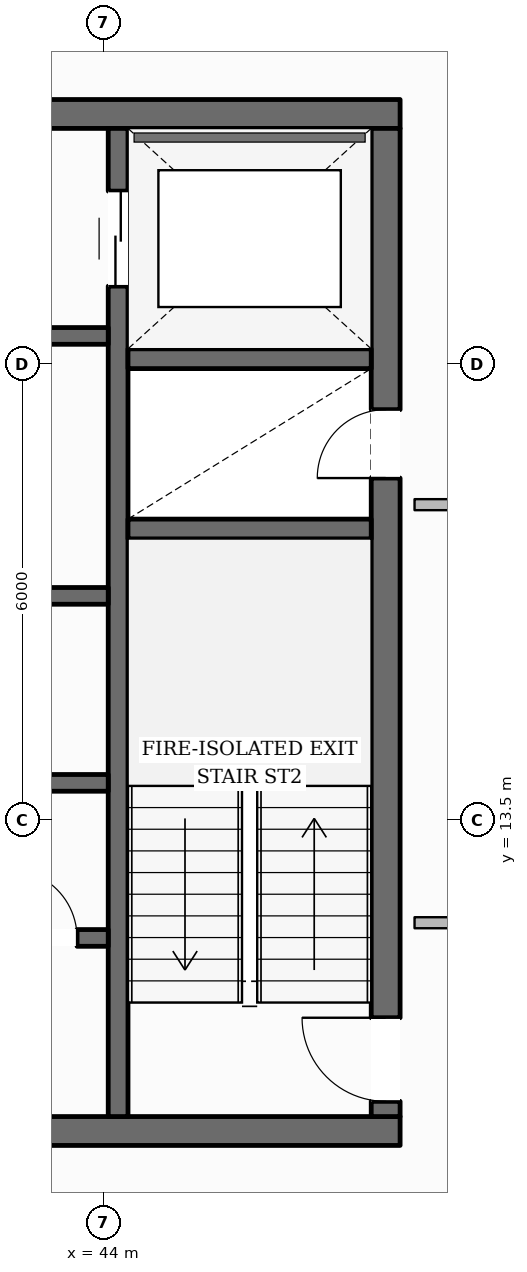
"""IFC4 building model, lengths in metres.
Left out: names, types, materials, properties, quantities, classifications, styles, units other than length and angle.
Written with IfcOpenShell. Run it as: python <this file> out.ifc"""

import sys

from ifc_helpers import new_model, si_unit, direction, frame, frame_2d, origin, place, context, subcontext, project, spatial, rectangle, extrude, element, fill, save


model = new_model("IFC4")
c1 = context("Model", 3, precision=1e-05, world=origin(), true_north=direction((0.0, 1.0)))
c2 = subcontext(c1, "Body", "Model", "MODEL_VIEW")
j1 = project(units=[si_unit("LENGTHUNIT", "METRE"), si_unit("PLANEANGLEUNIT", "RADIAN")], contexts=[c1])
p1 = place(None, origin())
s1 = spatial("IfcSite", under=j1, at=p1, CompositionType="ELEMENT")
p2 = place(p1, origin())
s2 = spatial("IfcBuilding", under=s1, at=p2, CompositionType="ELEMENT")
p3 = place(p2, frame((0.0, 0.0, 293.4)))
s3 = spatial("IfcBuildingStorey", under=s2, at=p3, CompositionType="ELEMENT", Elevation=293.4)
p4 = place(p3, frame((28.1, 9.41, 0.0), z_axis=(0.0, 0.0, 1.0), x_axis=(1.0, 0.0, 0.0)))
e1 = element("IfcWall", 1, at=p4, inside=s3, PredefinedType="SOLIDWALL", context=c2, shape_type="SweptSolid", body=[
    extrude(rectangle(XDim=19.8, YDim=0.38, at=frame_2d((9.9, 0.0))), origin(), (0.0, 0.0, 1.0), 3.61),
])
p5 = place(p4, frame((10.4, 0.0, 0.0)))
e2 = element("IfcOpeningElement", 2, at=p5, cuts=e1, PredefinedType="OPENING", context=c2, shape_type="SweptSolid", body=[
    extrude(rectangle(XDim=1.4, YDim=2.2, at=frame_2d((0.7, 1.1))), frame((0.0, 0.2, 0.0), z_axis=(0.0, -1.0, 0.0), x_axis=(1.0, 0.0, 0.0)), (0.0, 0.0, 1.0), 0.4),
])
p6 = place(p3, frame((28.1, 22.79, 0.0), z_axis=(0.0, 0.0, 1.0), x_axis=(1.0, 0.0, 0.0)))
e3 = element("IfcWall", 3, at=p6, inside=s3, PredefinedType="SOLIDWALL", context=c2, shape_type="SweptSolid", body=[
    extrude(rectangle(XDim=19.8, YDim=0.38, at=frame_2d((9.9, 0.0))), origin(), (0.0, 0.0, 1.0), 3.61),
])
p7 = place(p6, frame((6.175, 0.0, 0.0)))
e4 = element("IfcOpeningElement", 4, at=p7, cuts=e3, PredefinedType="OPENING", context=c2, shape_type="SweptSolid", body=[
    extrude(rectangle(XDim=1.05, YDim=2.15, at=frame_2d((0.525, 1.075))), frame((0.0, 0.2, 0.0), z_axis=(0.0, -1.0, 0.0), x_axis=(1.0, 0.0, 0.0)), (0.0, 0.0, 1.0), 0.4),
])
p8 = place(p6, frame((12.575, 0.0, 0.0)))
e5 = element("IfcOpeningElement", 5, at=p8, cuts=e3, PredefinedType="OPENING", context=c2, shape_type="SweptSolid", body=[
    extrude(rectangle(XDim=1.05, YDim=2.15, at=frame_2d((0.525, 1.075))), frame((0.0, 0.2, 0.0), z_axis=(0.0, -1.0, 0.0), x_axis=(1.0, 0.0, 0.0)), (0.0, 0.0, 1.0), 0.4),
])
p9 = place(p3, frame((47.71, 9.6, 0.0), z_axis=(0.0, 0.0, 1.0), x_axis=(0.0, 1.0, 0.0)))
e6 = element("IfcWall", 6, at=p9, inside=s3, PredefinedType="SOLIDWALL", context=c2, shape_type="SweptSolid", body=[
    extrude(rectangle(XDim=13.0, YDim=0.38, at=frame_2d((6.5, 0.0))), origin(), (0.0, 0.0, 1.0), 3.61),
])
p10 = place(p9, frame((0.2, 0.0, 0.0)))
e7 = element("IfcOpeningElement", 7, at=p10, cuts=e6, PredefinedType="OPENING", context=c2, shape_type="SweptSolid", body=[
    extrude(rectangle(XDim=1.1, YDim=2.15, at=frame_2d((0.55, 1.075))), frame((0.0, 0.2, 0.0), z_axis=(0.0, -1.0, 0.0), x_axis=(1.0, 0.0, 0.0)), (0.0, 0.0, 1.0), 0.4),
])
p11 = place(p9, frame((8.4, 0.0, 0.0)))
e8 = element("IfcOpeningElement", 8, at=p11, cuts=e6, PredefinedType="OPENING", context=c2, shape_type="SweptSolid", body=[
    extrude(rectangle(XDim=0.9, YDim=2.1, at=frame_2d((0.45, 1.05))), frame((0.0, 0.2, 0.0), z_axis=(0.0, -1.0, 0.0), x_axis=(1.0, 0.0, 0.0)), (0.0, 0.0, 1.0), 0.4),
])
p12 = place(p3, frame((44.19, 9.6, 0.0), z_axis=(0.0, 0.0, 1.0), x_axis=(0.0, 1.0, 0.0)))
e9 = element("IfcWall", 9, at=p12, inside=s3, PredefinedType="SHEAR", context=c2, shape_type="SweptSolid", body=[
    extrude(rectangle(XDim=13.0, YDim=0.26, at=frame_2d((6.5, 0.0))), origin(), (0.0, 0.0, 1.0), 3.61),
])
p13 = place(p12, frame((10.925, 0.0, 0.0)))
e10 = element("IfcOpeningElement", 10, at=p13, cuts=e9, PredefinedType="OPENING", context=c2, shape_type="SweptSolid", body=[
    extrude(rectangle(XDim=1.25, YDim=2.25, at=frame_2d((0.625, 1.125))), frame((0.0, 0.14, 0.0), z_axis=(0.0, -1.0, 0.0), x_axis=(1.0, 0.0, 0.0)), (0.0, 0.0, 1.0), 0.28),
])
for number, where, z_axis, x_axis in (
    (11, (44.32, 17.33, 0.0), (0.0, 0.0, 1.0), (1.0, 0.0, 0.0)),
    (12, (44.32, 19.57, 0.0), (0.0, 0.0, 1.0), (1.0, 0.0, 0.0)),
):
    element("IfcWall", number, at=place(p3, frame(where, z_axis=z_axis, x_axis=x_axis)), inside=s3, PredefinedType="SHEAR", context=c2, shape_type="SweptSolid", body=[
        extrude(rectangle(XDim=3.2, YDim=0.26, at=frame_2d((1.6, 0.0))), origin(), (0.0, 0.0, 1.0), 3.61),
    ])
p14 = place(p3, frame((31.94, 19.87, 0.0), z_axis=(0.0, 0.0, 1.0), x_axis=(1.0, 0.0, 0.0)))
e13 = element("IfcWall", 13, at=p14, inside=s3, PredefinedType="SOLIDWALL", context=c2, shape_type="SweptSolid", body=[
    extrude(rectangle(XDim=12.12, YDim=0.22, at=frame_2d((6.06, 0.0))), origin(), (0.0, 0.0, 1.0), 3.61),
])
p15 = place(p14, frame((6.3, 0.0, 0.0)))
e14 = element("IfcOpeningElement", 14, at=p15, cuts=e13, PredefinedType="OPENING", context=c2, shape_type="SweptSolid", body=[
    extrude(rectangle(XDim=1.1, YDim=2.15, at=frame_2d((0.55, 1.075))), frame((0.0, 0.12, 0.0), z_axis=(0.0, -1.0, 0.0), x_axis=(1.0, 0.0, 0.0)), (0.0, 0.0, 1.0), 0.24),
])
p16 = place(p14, frame((9.51, 0.0, 0.0)))
e15 = element("IfcOpeningElement", 15, at=p16, cuts=e13, PredefinedType="OPENING", context=c2, shape_type="SweptSolid", body=[
    extrude(rectangle(XDim=0.9, YDim=2.1, at=frame_2d((0.45, 1.05))), frame((0.0, 0.12, 0.0), z_axis=(0.0, -1.0, 0.0), x_axis=(1.0, 0.0, 0.0)), (0.0, 0.0, 1.0), 0.24),
])
p17 = place(p3, frame((31.94, 16.45, 0.0), z_axis=(0.0, 0.0, 1.0), x_axis=(1.0, 0.0, 0.0)))
e16 = element("IfcWall", 16, at=p17, inside=s3, PredefinedType="SOLIDWALL", context=c2, shape_type="SweptSolid", body=[
    extrude(rectangle(XDim=12.12, YDim=0.22, at=frame_2d((6.06, 0.0))), origin(), (0.0, 0.0, 1.0), 3.61),
])
p18 = place(p3, frame((31.94, 13.99, 0.0), z_axis=(0.0, 0.0, 1.0), x_axis=(1.0, 0.0, 0.0)))
e17 = element("IfcWall", 17, at=p18, inside=s3, PredefinedType="SOLIDWALL", context=c2, shape_type="SweptSolid", body=[
    extrude(rectangle(XDim=12.12, YDim=0.22, at=frame_2d((6.06, 0.0))), origin(), (0.0, 0.0, 1.0), 3.61),
])
p19 = place(p18, frame((3.11, 0.0, 0.0)))
e18 = element("IfcOpeningElement", 18, at=p19, cuts=e17, PredefinedType="OPENING", context=c2, shape_type="SweptSolid", body=[
    extrude(rectangle(XDim=0.9, YDim=2.1, at=frame_2d((0.45, 1.05))), frame((0.0, 0.12, 0.0), z_axis=(0.0, -1.0, 0.0), x_axis=(1.0, 0.0, 0.0)), (0.0, 0.0, 1.0), 0.24),
])
p20 = place(p18, frame((9.21, 0.0, 0.0)))
e19 = element("IfcOpeningElement", 19, at=p20, cuts=e17, PredefinedType="OPENING", context=c2, shape_type="SweptSolid", body=[
    extrude(rectangle(XDim=0.9, YDim=2.1, at=frame_2d((0.45, 1.05))), frame((0.0, 0.12, 0.0), z_axis=(0.0, -1.0, 0.0), x_axis=(1.0, 0.0, 0.0)), (0.0, 0.0, 1.0), 0.24),
])
p21 = place(p3, frame((40.28, 11.95, 0.0), z_axis=(0.0, 0.0, 1.0), x_axis=(1.0, 0.0, 0.0)))
e20 = element("IfcWall", 20, at=p21, inside=s3, PredefinedType="SOLIDWALL", context=c2, shape_type="SweptSolid", body=[
    extrude(rectangle(XDim=3.78, YDim=0.22, at=frame_2d((1.89, 0.0))), origin(), (0.0, 0.0, 1.0), 3.61),
])
p22 = place(p21, frame((0.62, 0.0, 0.0)))
e21 = element("IfcOpeningElement", 21, at=p22, cuts=e20, PredefinedType="OPENING", context=c2, shape_type="SweptSolid", body=[
    extrude(rectangle(XDim=0.9, YDim=2.1, at=frame_2d((0.45, 1.05))), frame((0.0, 0.12, 0.0), z_axis=(0.0, -1.0, 0.0), x_axis=(1.0, 0.0, 0.0)), (0.0, 0.0, 1.0), 0.24),
])
p23 = place(p21, frame((2.47, 0.0, 0.0)))
e22 = element("IfcOpeningElement", 22, at=p23, cuts=e20, PredefinedType="OPENING", context=c2, shape_type="SweptSolid", body=[
    extrude(rectangle(XDim=0.9, YDim=2.1, at=frame_2d((0.45, 1.05))), frame((0.0, 0.12, 0.0), z_axis=(0.0, -1.0, 0.0), x_axis=(1.0, 0.0, 0.0)), (0.0, 0.0, 1.0), 0.24),
])
p24 = place(p3, frame((40.595, 44.482, 0.0), z_axis=(0.0, 0.0, 1.0), x_axis=(0.491607932601, -0.870816651543, 0.0)))
e23 = element("IfcWall", 23, at=p24, inside=s3, PredefinedType="STANDARD", context=c2, shape_type="SweptSolid", body=[
    extrude(rectangle(XDim=38.965, YDim=0.35, at=frame_2d((19.482, 0.0))), origin(), (0.0, 0.0, 1.0), 3.196),
])
p25 = place(p24, frame((9.341, 0.0, 0.0)))
e24 = element("IfcOpeningElement", 24, at=p25, cuts=e23, PredefinedType="OPENING", context=c2, shape_type="SweptSolid", body=[
    extrude(rectangle(XDim=1.0, YDim=2.2, at=frame_2d((0.5, 1.1))), frame((0.0, 0.185, 0.0), z_axis=(0.0, -1.0, 0.0), x_axis=(1.0, 0.0, 0.0)), (0.0, 0.0, 1.0), 0.37),
])
p26 = place(p24, frame((34.648, 0.0, 0.65)))
e25 = element("IfcOpeningElement", 25, at=p26, cuts=e23, PredefinedType="OPENING", context=c2, shape_type="SweptSolid", body=[
    extrude(rectangle(XDim=1.35, YDim=1.75, at=frame_2d((0.675, 0.875))), frame((0.0, 0.185, 0.0), z_axis=(0.0, -1.0, 0.0), x_axis=(1.0, 0.0, 0.0)), (0.0, 0.0, 1.0), 0.37),
])
p27 = place(p24, frame((28.314, 0.0, 0.65)))
e26 = element("IfcOpeningElement", 26, at=p27, cuts=e23, PredefinedType="OPENING", context=c2, shape_type="SweptSolid", body=[
    extrude(rectangle(XDim=1.35, YDim=1.75, at=frame_2d((0.675, 0.875))), frame((0.0, 0.185, 0.0), z_axis=(0.0, -1.0, 0.0), x_axis=(1.0, 0.0, 0.0)), (0.0, 0.0, 1.0), 0.37),
])
p28 = place(p24, frame((21.979, 0.0, 0.65)))
e27 = element("IfcOpeningElement", 27, at=p28, cuts=e23, PredefinedType="OPENING", context=c2, shape_type="SweptSolid", body=[
    extrude(rectangle(XDim=1.35, YDim=1.75, at=frame_2d((0.675, 0.875))), frame((0.0, 0.185, 0.0), z_axis=(0.0, -1.0, 0.0), x_axis=(1.0, 0.0, 0.0)), (0.0, 0.0, 1.0), 0.37),
])
p29 = place(p24, frame((2.976, 0.0, 0.65)))
e28 = element("IfcOpeningElement", 28, at=p29, cuts=e23, PredefinedType="OPENING", context=c2, shape_type="SweptSolid", body=[
    extrude(rectangle(XDim=1.35, YDim=1.75, at=frame_2d((0.675, 0.875))), frame((0.0, 0.185, 0.0), z_axis=(0.0, -1.0, 0.0), x_axis=(1.0, 0.0, 0.0)), (0.0, 0.0, 1.0), 0.37),
])
for number, where, z_axis, x_axis in (
    (29, (49.91, 17.65, 0.0), (0.0, 0.0, 1.0), (-1.0, 0.0, 0.0)),
    (30, (48.09, 12.15, 0.0), (0.0, 0.0, 1.0), (1.0, 0.0, 0.0)),
):
    element("IfcWall", number, at=place(p3, frame(where, z_axis=z_axis, x_axis=x_axis)), inside=s3, PredefinedType="PARTITIONING", context=c2, shape_type="SweptSolid", body=[
        extrude(rectangle(XDim=1.82, YDim=0.145, at=frame_2d((0.91, 0.0))), origin(), (0.0, 0.0, 1.0), 3.61),
    ])
p30 = place(p10, origin())
e31 = element("IfcDoor", 31, at=p30, inside=s3, OperationType="SINGLE_SWING_RIGHT", PredefinedType="DOOR", context=c2, shape_type="SweptSolid", body=[
    extrude(rectangle(XDim=1.1, YDim=2.15, at=frame_2d((0.55, 1.075))), frame((0.0, 0.025, 0.0), z_axis=(0.0, -1.0, 0.0), x_axis=(1.0, 0.0, 0.0)), (0.0, 0.0, 1.0), 0.05),
])
fill(e7, e31)
p31 = place(p11, origin())
e32 = element("IfcDoor", 32, at=p31, inside=s3, OperationType="SINGLE_SWING_LEFT", PredefinedType="DOOR", context=c2, shape_type="SweptSolid", body=[
    extrude(rectangle(XDim=0.9, YDim=2.1, at=frame_2d((0.45, 1.05))), frame((0.0, 0.025, 0.0), z_axis=(0.0, -1.0, 0.0), x_axis=(1.0, 0.0, 0.0)), (0.0, 0.0, 1.0), 0.05),
])
fill(e8, e32)
p32 = place(p13, origin())
e33 = element("IfcDoor", 33, at=p32, inside=s3, OperationType="DOUBLE_DOOR_SLIDING", PredefinedType="DOOR", context=c2, shape_type="SweptSolid", body=[
    extrude(rectangle(XDim=1.25, YDim=2.25, at=frame_2d((0.625, 1.125))), frame((0.0, 0.025, 0.0), z_axis=(0.0, -1.0, 0.0), x_axis=(1.0, 0.0, 0.0)), (0.0, 0.0, 1.0), 0.05),
])
fill(e10, e33)
p33 = place(p23, origin())
e34 = element("IfcDoor", 34, at=p33, inside=s3, OperationType="SINGLE_SWING_LEFT", PredefinedType="DOOR", context=c2, shape_type="SweptSolid", body=[
    extrude(rectangle(XDim=0.9, YDim=2.1, at=frame_2d((0.45, 1.05))), frame((0.0, 0.025, 0.0), z_axis=(0.0, -1.0, 0.0), x_axis=(1.0, 0.0, 0.0)), (0.0, 0.0, 1.0), 0.05),
])
fill(e22, e34)
save(model, sys.argv[1])
